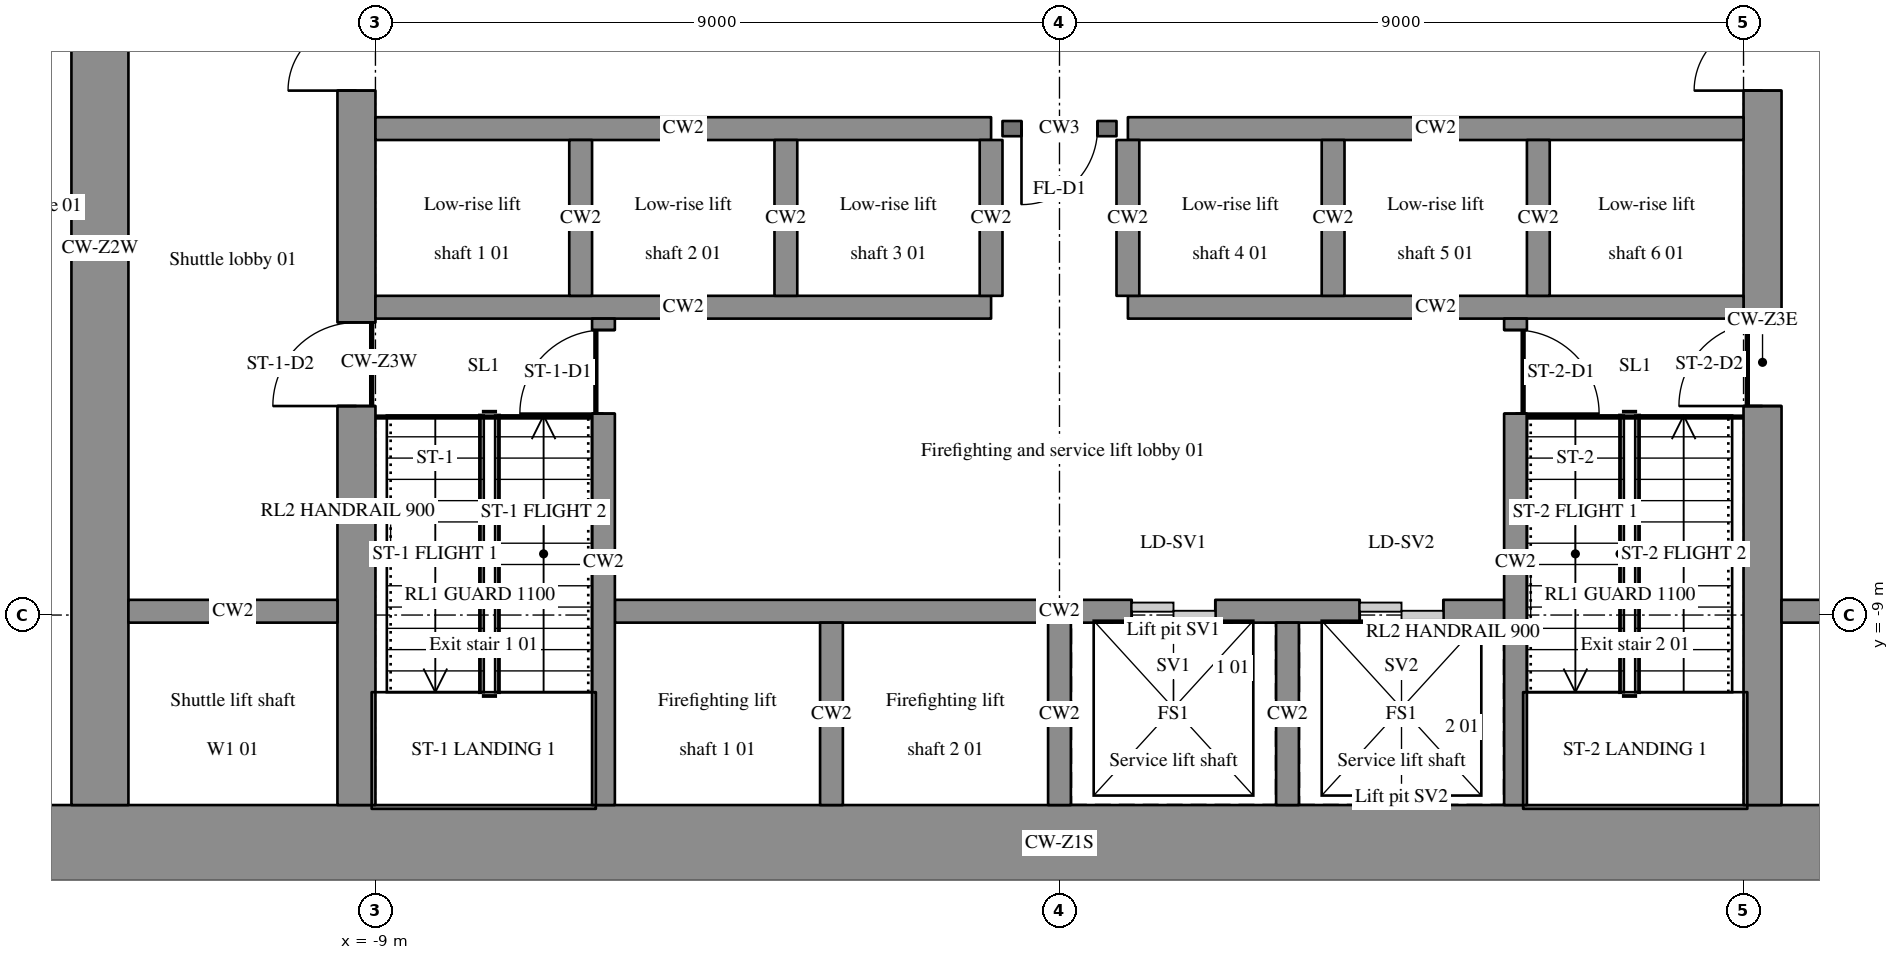
"""IFC4 building model, lengths in metres.
Left out: names, types, materials, properties, quantities, classifications, styles, units other than length and angle.
Written with IfcOpenShell. Run it as: python <this file> out.ifc"""

import sys

from ifc_helpers import new_model, si_unit, direction, frame, frame_2d, origin, place, context, subcontext, project, spatial, rectangle, extrude, element, fill, save


model = new_model("IFC4")
c1 = context("Model", 3, precision=1e-05, world=origin(), true_north=direction((0.0, 1.0)))
c2 = subcontext(c1, "Body", "Model", "MODEL_VIEW")
j1 = project(units=[si_unit("LENGTHUNIT", "METRE"), si_unit("PLANEANGLEUNIT", "RADIAN")], contexts=[c1])
p1 = place(None, origin())
s1 = spatial("IfcSite", under=j1, at=p1, CompositionType="ELEMENT")
p2 = place(p1, origin())
s2 = spatial("IfcBuilding", under=s1, at=p2, CompositionType="ELEMENT")
p3 = place(p2, frame((0.0, 0.0, -5.0)))
s3 = spatial("IfcBuildingStorey", under=s2, at=p3, CompositionType="ELEMENT", Elevation=-5.0)
p4 = place(p3, frame((-15.0, -12.0, -0.25), z_axis=(0.0, 0.0, 1.0), x_axis=(1.0, 0.0, 0.0)))
e1 = element("IfcWall", 1, at=p4, inside=s3, PredefinedType="SHEAR", context=c2, shape_type="SweptSolid", body=[
    extrude(rectangle(XDim=30.0, YDim=1.0, at=frame_2d((15.0, 0.0))), origin(), (0.0, 0.0, 1.0), 5.25),
])
p5 = place(p3, frame((-12.625, -11.5, -0.25), z_axis=(0.0, 0.0, 1.0), x_axis=(0.0, 1.0, 0.0)))
e2 = element("IfcWall", 2, at=p5, inside=s3, PredefinedType="SHEAR", context=c2, shape_type="SweptSolid", body=[
    extrude(rectangle(XDim=14.65, YDim=0.75, at=frame_2d((7.325, 0.0))), origin(), (0.0, 0.0, 1.0), 5.25),
])
p6 = place(p5, frame((10.05, 0.0, 0.0)))
e3 = element("IfcOpeningElement", 3, at=p6, cuts=e2, PredefinedType="OPENING", context=c2, shape_type="SweptSolid", body=[
    extrude(rectangle(XDim=0.9, YDim=2.1, at=frame_2d((0.45, 1.05))), frame((0.0, 0.385, 0.0), z_axis=(0.0, -1.0, 0.0), x_axis=(1.0, 0.0, 0.0)), (0.0, 0.0, 1.0), 0.77),
])
p7 = place(p3, frame((-9.25, -11.5, -0.25), z_axis=(0.0, 0.0, 1.0), x_axis=(0.0, 1.0, 0.0)))
e4 = element("IfcWall", 4, at=p7, inside=s3, PredefinedType="SHEAR", context=c2, shape_type="SweptSolid", body=[
    extrude(rectangle(XDim=11.65, YDim=0.5, at=frame_2d((5.825, 0.0))), origin(), (0.0, 0.0, 1.0), 5.25),
])
p8 = place(p7, frame((9.4, 0.0, 0.0)))
e5 = element("IfcOpeningElement", 5, at=p8, cuts=e4, PredefinedType="OPENING", context=c2, shape_type="SweptSolid", body=[
    extrude(rectangle(XDim=1.8, YDim=2.1, at=frame_2d((0.9, 1.05))), frame((0.0, 0.26, 0.0), z_axis=(0.0, -1.0, 0.0), x_axis=(1.0, 0.0, 0.0)), (0.0, 0.0, 1.0), 0.52),
])
p9 = place(p7, frame((5.25, 0.0, 0.0)))
e6 = element("IfcOpeningElement", 6, at=p9, cuts=e4, PredefinedType="OPENING", context=c2, shape_type="SweptSolid", body=[
    extrude(rectangle(XDim=1.1, YDim=2.1, at=frame_2d((0.55, 1.05))), frame((0.0, 0.26, 0.0), z_axis=(0.0, -1.0, 0.0), x_axis=(1.0, 0.0, 0.0)), (0.0, 0.0, 1.0), 0.52),
])
p10 = place(p3, frame((9.25, -11.5, -0.25), z_axis=(0.0, 0.0, 1.0), x_axis=(0.0, 1.0, 0.0)))
e7 = element("IfcWall", 7, at=p10, inside=s3, PredefinedType="SHEAR", context=c2, shape_type="SweptSolid", body=[
    extrude(rectangle(XDim=11.65, YDim=0.5, at=frame_2d((5.825, 0.0))), origin(), (0.0, 0.0, 1.0), 5.25),
])
p11 = place(p10, frame((9.4, 0.0, 0.0)))
e8 = element("IfcOpeningElement", 8, at=p11, cuts=e7, PredefinedType="OPENING", context=c2, shape_type="SweptSolid", body=[
    extrude(rectangle(XDim=1.8, YDim=2.1, at=frame_2d((0.9, 1.05))), frame((0.0, 0.26, 0.0), z_axis=(0.0, -1.0, 0.0), x_axis=(1.0, 0.0, 0.0)), (0.0, 0.0, 1.0), 0.52),
])
p12 = place(p10, frame((5.25, 0.0, 0.0)))
e9 = element("IfcOpeningElement", 9, at=p12, cuts=e7, PredefinedType="OPENING", context=c2, shape_type="SweptSolid", body=[
    extrude(rectangle(XDim=1.1, YDim=2.1, at=frame_2d((0.55, 1.05))), frame((0.0, 0.26, 0.0), z_axis=(0.0, -1.0, 0.0), x_axis=(1.0, 0.0, 0.0)), (0.0, 0.0, 1.0), 0.52),
])
p13 = place(p3, frame((-12.25, -8.95, 0.0), z_axis=(0.0, 0.0, 1.0), x_axis=(1.0, 0.0, 0.0)))
e10 = element("IfcWall", 10, at=p13, inside=s3, PredefinedType="SHEAR", context=c2, shape_type="SweptSolid", body=[
    extrude(rectangle(XDim=2.75, YDim=0.3, at=frame_2d((1.375, 0.0))), origin(), (0.0, 0.0, 1.0), 5.0),
])
p14 = place(p3, frame((-5.85, -8.95, 0.0), z_axis=(0.0, 0.0, 1.0), x_axis=(1.0, 0.0, 0.0)))
e11 = element("IfcWall", 11, at=p14, inside=s3, PredefinedType="SHEAR", context=c2, shape_type="SweptSolid", body=[
    extrude(rectangle(XDim=11.7, YDim=0.3, at=frame_2d((5.85, 0.0))), origin(), (0.0, 0.0, 1.0), 5.0),
])
p15 = place(p14, frame((6.8, 0.0, 0.0)))
e12 = element("IfcOpeningElement", 12, at=p15, cuts=e11, PredefinedType="OPENING", context=c2, shape_type="SweptSolid", body=[
    extrude(rectangle(XDim=1.1, YDim=2.1, at=frame_2d((0.55, 1.05))), frame((0.0, 0.16, 0.0), z_axis=(0.0, -1.0, 0.0), x_axis=(1.0, 0.0, 0.0)), (0.0, 0.0, 1.0), 0.32),
])
p16 = place(p14, frame((9.8, 0.0, 0.0)))
e13 = element("IfcOpeningElement", 13, at=p16, cuts=e11, PredefinedType="OPENING", context=c2, shape_type="SweptSolid", body=[
    extrude(rectangle(XDim=1.1, YDim=2.1, at=frame_2d((0.55, 1.05))), frame((0.0, 0.16, 0.0), z_axis=(0.0, -1.0, 0.0), x_axis=(1.0, 0.0, 0.0)), (0.0, 0.0, 1.0), 0.32),
])
p17 = place(p3, frame((9.5, -8.95, 0.0), z_axis=(0.0, 0.0, 1.0), x_axis=(1.0, 0.0, 0.0)))
e14 = element("IfcWall", 14, at=p17, inside=s3, PredefinedType="SHEAR", context=c2, shape_type="SweptSolid", body=[
    extrude(rectangle(XDim=2.75, YDim=0.3, at=frame_2d((1.375, 0.0))), origin(), (0.0, 0.0, 1.0), 5.0),
])
for number, where, z_axis, x_axis in (
    (15, (-9.0, -4.95, 0.0), (0.0, 0.0, 1.0), (1.0, 0.0, 0.0)),
    (16, (0.9, -4.95, 0.0), (0.0, 0.0, 1.0), (1.0, 0.0, 0.0)),
    (17, (-9.0, -2.6, 0.0), (0.0, 0.0, 1.0), (1.0, 0.0, 0.0)),
):
    element("IfcWall", number, at=place(p3, frame(where, z_axis=z_axis, x_axis=x_axis)), inside=s3, PredefinedType="SHEAR", context=c2, shape_type="SweptSolid", body=[
        extrude(rectangle(XDim=8.1, YDim=0.3, at=frame_2d((4.05, 0.0))), origin(), (0.0, 0.0, 1.0), 5.0),
    ])
p18 = place(p3, frame((0.75, -2.6, 0.0), z_axis=(0.0, 0.0, 1.0), x_axis=(-1.0, 0.0, 0.0)))
e18 = element("IfcWall", 18, at=p18, inside=s3, PredefinedType="SOLIDWALL", context=c2, shape_type="SweptSolid", body=[
    extrude(rectangle(XDim=1.5, YDim=0.2, at=frame_2d((0.75, 0.0))), origin(), (0.0, 0.0, 1.0), 4.7),
])
p19 = place(p18, frame((0.25, 0.0, 0.0)))
e19 = element("IfcOpeningElement", 19, at=p19, cuts=e18, PredefinedType="OPENING", context=c2, shape_type="SweptSolid", body=[
    extrude(rectangle(XDim=1.0, YDim=2.1, at=frame_2d((0.5, 1.05))), frame((0.0, 0.11, 0.0), z_axis=(0.0, -1.0, 0.0), x_axis=(1.0, 0.0, 0.0)), (0.0, 0.0, 1.0), 0.22),
])
p20 = place(p3, frame((0.9, -2.6, 0.0), z_axis=(0.0, 0.0, 1.0), x_axis=(1.0, 0.0, 0.0)))
e20 = element("IfcWall", 20, at=p20, inside=s3, PredefinedType="SHEAR", context=c2, shape_type="SweptSolid", body=[
    extrude(rectangle(XDim=8.1, YDim=0.3, at=frame_2d((4.05, 0.0))), origin(), (0.0, 0.0, 1.0), 5.0),
])
p21 = place(p3, frame((-6.3, -4.8, 0.0), z_axis=(0.0, 0.0, 1.0), x_axis=(0.0, 1.0, 0.0)))
e21 = element("IfcWall", 21, at=p21, inside=s3, PredefinedType="SHEAR", context=c2, shape_type="SweptSolid", body=[
    extrude(rectangle(XDim=2.05, YDim=0.3, at=frame_2d((1.025, 0.0))), origin(), (0.0, 0.0, 1.0), 5.0),
])
p22 = place(p3, frame((-6.0, -11.5, 0.0), z_axis=(0.0, 0.0, 1.0), x_axis=(0.0, 1.0, 0.0)))
e22 = element("IfcWall", 22, at=p22, inside=s3, PredefinedType="SHEAR", context=c2, shape_type="SweptSolid", body=[
    extrude(rectangle(XDim=6.4, YDim=0.3, at=frame_2d((3.2, 0.0))), origin(), (0.0, 0.0, 1.0), 5.0),
])
p23 = place(p22, frame((5.15, 0.0, 0.0)))
e23 = element("IfcOpeningElement", 23, at=p23, cuts=e22, PredefinedType="OPENING", context=c2, shape_type="SweptSolid", body=[
    extrude(rectangle(XDim=1.1, YDim=2.1, at=frame_2d((0.55, 1.05))), frame((0.0, 0.16, 0.0), z_axis=(0.0, -1.0, 0.0), x_axis=(1.0, 0.0, 0.0)), (0.0, 0.0, 1.0), 0.32),
])
p24 = place(p3, frame((-3.6, -4.8, 0.0), z_axis=(0.0, 0.0, 1.0), x_axis=(0.0, 1.0, 0.0)))
e24 = element("IfcWall", 24, at=p24, inside=s3, PredefinedType="SHEAR", context=c2, shape_type="SweptSolid", body=[
    extrude(rectangle(XDim=2.05, YDim=0.3, at=frame_2d((1.025, 0.0))), origin(), (0.0, 0.0, 1.0), 5.0),
])
p25 = place(p3, frame((-3.0, -11.5, 0.0), z_axis=(0.0, 0.0, 1.0), x_axis=(0.0, 1.0, 0.0)))
e25 = element("IfcWall", 25, at=p25, inside=s3, PredefinedType="SHEAR", context=c2, shape_type="SweptSolid", body=[
    extrude(rectangle(XDim=2.4, YDim=0.3, at=frame_2d((1.2, 0.0))), origin(), (0.0, 0.0, 1.0), 5.0),
])
p26 = place(p3, frame((-0.9, -4.8, 0.0), z_axis=(0.0, 0.0, 1.0), x_axis=(0.0, 1.0, 0.0)))
e26 = element("IfcWall", 26, at=p26, inside=s3, PredefinedType="SHEAR", context=c2, shape_type="SweptSolid", body=[
    extrude(rectangle(XDim=2.05, YDim=0.3, at=frame_2d((1.025, 0.0))), origin(), (0.0, 0.0, 1.0), 5.0),
])
p27 = place(p3, frame((0.0, -11.5, 0.0), z_axis=(0.0, 0.0, 1.0), x_axis=(0.0, 1.0, 0.0)))
e27 = element("IfcWall", 27, at=p27, inside=s3, PredefinedType="SHEAR", context=c2, shape_type="SweptSolid", body=[
    extrude(rectangle(XDim=2.4, YDim=0.3, at=frame_2d((1.2, 0.0))), origin(), (0.0, 0.0, 1.0), 5.0),
])
p28 = place(p3, frame((0.9, -4.8, 0.0), z_axis=(0.0, 0.0, 1.0), x_axis=(0.0, 1.0, 0.0)))
e28 = element("IfcWall", 28, at=p28, inside=s3, PredefinedType="SHEAR", context=c2, shape_type="SweptSolid", body=[
    extrude(rectangle(XDim=2.05, YDim=0.3, at=frame_2d((1.025, 0.0))), origin(), (0.0, 0.0, 1.0), 5.0),
])
p29 = place(p3, frame((3.0, -11.5, 0.0), z_axis=(0.0, 0.0, 1.0), x_axis=(0.0, 1.0, 0.0)))
e29 = element("IfcWall", 29, at=p29, inside=s3, PredefinedType="SHEAR", context=c2, shape_type="SweptSolid", body=[
    extrude(rectangle(XDim=2.4, YDim=0.3, at=frame_2d((1.2, 0.0))), origin(), (0.0, 0.0, 1.0), 5.0),
])
p30 = place(p3, frame((3.6, -4.8, 0.0), z_axis=(0.0, 0.0, 1.0), x_axis=(0.0, 1.0, 0.0)))
e30 = element("IfcWall", 30, at=p30, inside=s3, PredefinedType="SHEAR", context=c2, shape_type="SweptSolid", body=[
    extrude(rectangle(XDim=2.05, YDim=0.3, at=frame_2d((1.025, 0.0))), origin(), (0.0, 0.0, 1.0), 5.0),
])
p31 = place(p3, frame((6.0, -5.1, 0.0), z_axis=(0.0, 0.0, 1.0), x_axis=(0.0, -1.0, 0.0)))
e31 = element("IfcWall", 31, at=p31, inside=s3, PredefinedType="SHEAR", context=c2, shape_type="SweptSolid", body=[
    extrude(rectangle(XDim=6.4, YDim=0.3, at=frame_2d((3.2, 0.0))), origin(), (0.0, 0.0, 1.0), 5.0),
])
p32 = place(p31, frame((0.15, 0.0, 0.0)))
e32 = element("IfcOpeningElement", 32, at=p32, cuts=e31, PredefinedType="OPENING", context=c2, shape_type="SweptSolid", body=[
    extrude(rectangle(XDim=1.1, YDim=2.1, at=frame_2d((0.55, 1.05))), frame((0.0, 0.16, 0.0), z_axis=(0.0, -1.0, 0.0), x_axis=(1.0, 0.0, 0.0)), (0.0, 0.0, 1.0), 0.32),
])
p33 = place(p3, frame((6.3, -4.8, 0.0), z_axis=(0.0, 0.0, 1.0), x_axis=(0.0, 1.0, 0.0)))
e33 = element("IfcWall", 33, at=p33, inside=s3, PredefinedType="SHEAR", context=c2, shape_type="SweptSolid", body=[
    extrude(rectangle(XDim=2.05, YDim=0.3, at=frame_2d((1.025, 0.0))), origin(), (0.0, 0.0, 1.0), 5.0),
])
p34 = place(p11, origin())
e34 = element("IfcDoor", 34, at=p34, inside=s3, OperationType="DOUBLE_DOOR_SINGLE_SWING", PredefinedType="DOOR", context=c2, shape_type="SweptSolid", body=[
    extrude(rectangle(XDim=1.8, YDim=2.1, at=frame_2d((0.9, 1.05))), frame((0.0, 0.025, 0.0), z_axis=(0.0, -1.0, 0.0), x_axis=(1.0, 0.0, 0.0)), (0.0, 0.0, 1.0), 0.05),
])
fill(e8, e34)
p35 = place(p8, origin())
e35 = element("IfcDoor", 35, at=p35, inside=s3, OperationType="DOUBLE_DOOR_SINGLE_SWING", PredefinedType="DOOR", context=c2, shape_type="SweptSolid", body=[
    extrude(rectangle(XDim=1.8, YDim=2.1, at=frame_2d((0.9, 1.05))), frame((0.0, 0.025, 0.0), z_axis=(0.0, -1.0, 0.0), x_axis=(1.0, 0.0, 0.0)), (0.0, 0.0, 1.0), 0.05),
])
fill(e5, e35)
p36 = place(p19, origin())
e36 = element("IfcDoor", 36, at=p36, inside=s3, OperationType="SINGLE_SWING_RIGHT", PredefinedType="DOOR", context=c2, shape_type="SweptSolid", body=[
    extrude(rectangle(XDim=1.0, YDim=2.1, at=frame_2d((0.5, 1.05))), frame((0.0, 0.025, 0.0), z_axis=(0.0, -1.0, 0.0), x_axis=(1.0, 0.0, 0.0)), (0.0, 0.0, 1.0), 0.05),
])
fill(e19, e36)
p37 = place(p23, origin())
e37 = element("IfcDoor", 37, at=p37, inside=s3, OperationType="SINGLE_SWING_LEFT", PredefinedType="DOOR", context=c2, shape_type="SweptSolid", body=[
    extrude(rectangle(XDim=1.1, YDim=2.1, at=frame_2d((0.55, 1.05))), frame((0.0, 0.025, 0.0), z_axis=(0.0, -1.0, 0.0), x_axis=(1.0, 0.0, 0.0)), (0.0, 0.0, 1.0), 0.05),
])
fill(e23, e37)
p38 = place(p9, origin())
e38 = element("IfcDoor", 38, at=p38, inside=s3, OperationType="SINGLE_SWING_LEFT", PredefinedType="DOOR", context=c2, shape_type="SweptSolid", body=[
    extrude(rectangle(XDim=1.1, YDim=2.1, at=frame_2d((0.55, 1.05))), frame((0.0, 0.025, 0.0), z_axis=(0.0, -1.0, 0.0), x_axis=(1.0, 0.0, 0.0)), (0.0, 0.0, 1.0), 0.05),
])
fill(e6, e38)
p39 = place(p32, origin())
e39 = element("IfcDoor", 39, at=p39, inside=s3, OperationType="SINGLE_SWING_RIGHT", PredefinedType="DOOR", context=c2, shape_type="SweptSolid", body=[
    extrude(rectangle(XDim=1.1, YDim=2.1, at=frame_2d((0.55, 1.05))), frame((0.0, 0.025, 0.0), z_axis=(0.0, -1.0, 0.0), x_axis=(1.0, 0.0, 0.0)), (0.0, 0.0, 1.0), 0.05),
])
fill(e32, e39)
p40 = place(p12, origin())
e40 = element("IfcDoor", 40, at=p40, inside=s3, OperationType="SINGLE_SWING_LEFT", PredefinedType="DOOR", context=c2, shape_type="SweptSolid", body=[
    extrude(rectangle(XDim=1.1, YDim=2.1, at=frame_2d((0.55, 1.05))), frame((0.0, 0.025, 0.0), z_axis=(0.0, -1.0, 0.0), x_axis=(1.0, 0.0, 0.0)), (0.0, 0.0, 1.0), 0.05),
])
fill(e9, e40)
p41 = place(p15, origin())
e41 = element("IfcDoor", 41, at=p41, inside=s3, OperationType="DOUBLE_DOOR_SLIDING", PredefinedType="DOOR", context=c2, shape_type="SweptSolid", body=[
    extrude(rectangle(XDim=1.1, YDim=2.1, at=frame_2d((0.55, 1.05))), frame((0.0, 0.025, 0.0), z_axis=(0.0, -1.0, 0.0), x_axis=(1.0, 0.0, 0.0)), (0.0, 0.0, 1.0), 0.05),
])
fill(e12, e41)
p42 = place(p16, origin())
e42 = element("IfcDoor", 42, at=p42, inside=s3, OperationType="DOUBLE_DOOR_SLIDING", PredefinedType="DOOR", context=c2, shape_type="SweptSolid", body=[
    extrude(rectangle(XDim=1.1, YDim=2.1, at=frame_2d((0.55, 1.05))), frame((0.0, 0.025, 0.0), z_axis=(0.0, -1.0, 0.0), x_axis=(1.0, 0.0, 0.0)), (0.0, 0.0, 1.0), 0.05),
])
fill(e13, e42)
save(model, sys.argv[1])
